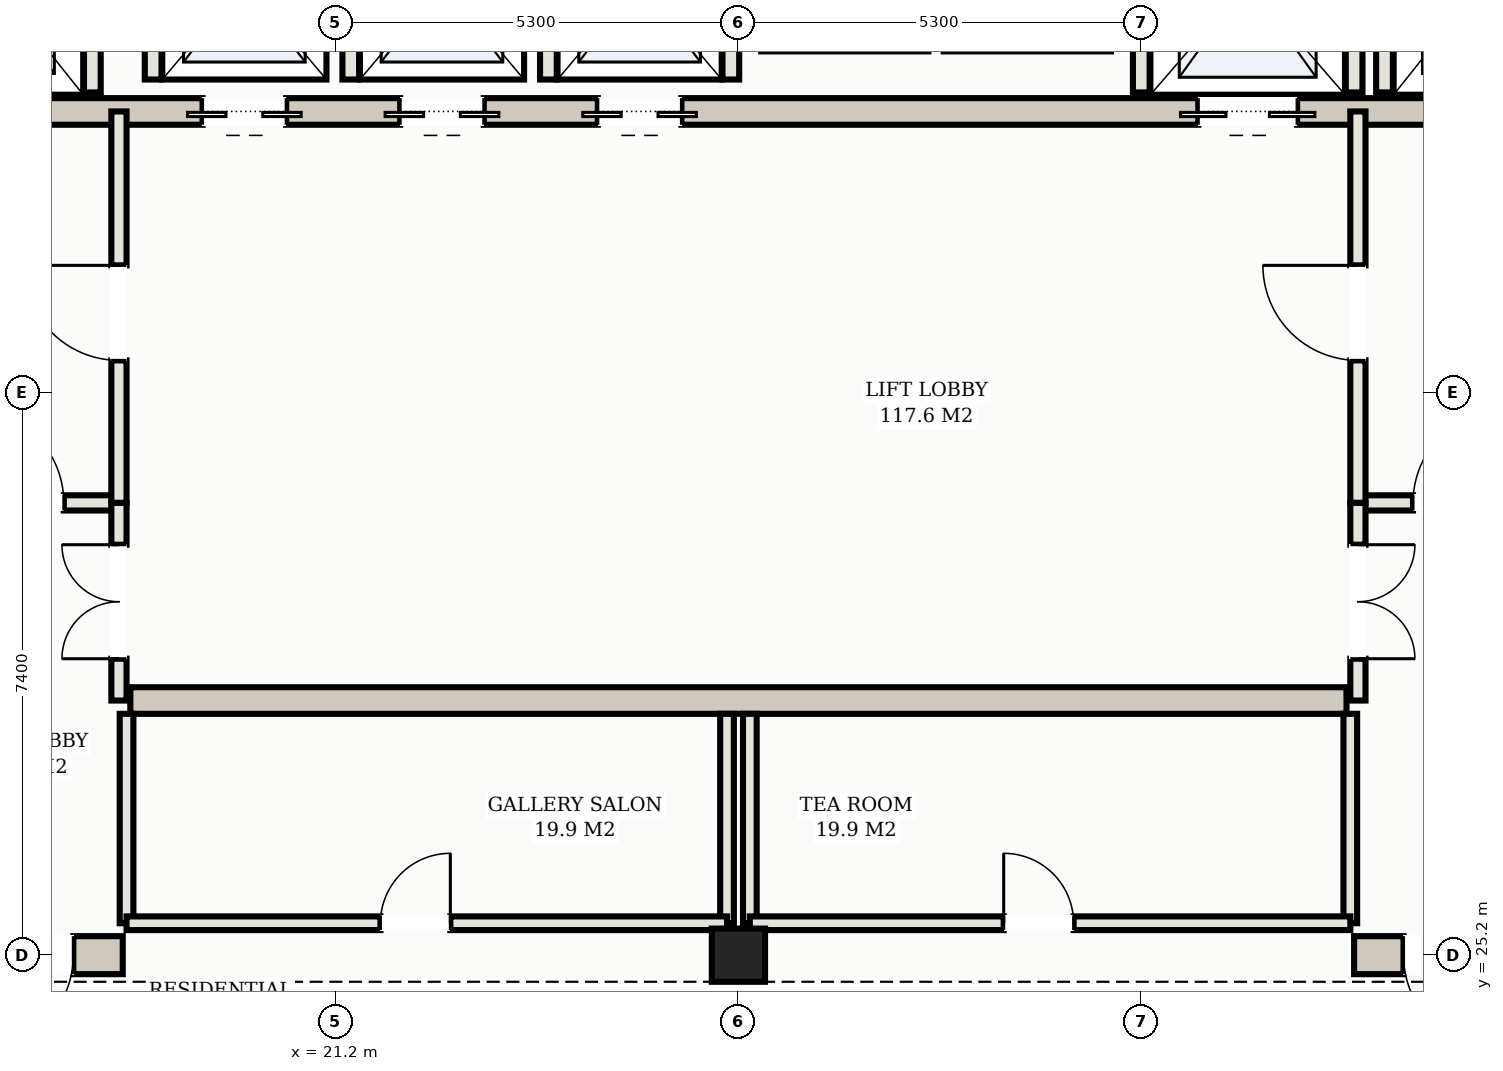
"""IFC4 building model, lengths in metres.
Left out: names, types, materials, properties, quantities, classifications, styles, units other than length and angle.
Written with IfcOpenShell. Run it as: python <this file> out.ifc"""

import sys

from ifc_helpers import new_model, si_unit, direction, frame, frame_2d, origin, origin_2d, place, context, subcontext, project, spatial, rectangle, hollow_rectangle, extrude, element, fill, save


model = new_model("IFC4")
c1 = context("Model", 3, precision=1e-05, world=origin(), true_north=direction((0.0, 1.0)))
c2 = subcontext(c1, "Body", "Model", "MODEL_VIEW")
j1 = project(units=[si_unit("LENGTHUNIT", "METRE"), si_unit("PLANEANGLEUNIT", "RADIAN")], contexts=[c1])
p1 = place(None, origin())
s1 = spatial("IfcSite", under=j1, at=p1, CompositionType="ELEMENT")
p2 = place(p1, origin())
s2 = spatial("IfcBuilding", under=s1, at=p2, CompositionType="ELEMENT")
p3 = place(p2, frame((0.0, 0.0, 242.9)))
s3 = spatial("IfcBuildingStorey", under=s2, at=p3, CompositionType="ELEMENT", Elevation=242.9)
p4 = place(p3, frame((10.35, 25.2, 0.0), z_axis=(0.0, 0.0, 1.0), x_axis=(1.0, 0.0, 0.0)))
e1 = element("IfcWall", 1, at=p4, inside=s3, PredefinedType="SHEAR", context=c2, shape_type="SweptSolid", body=[
    extrude(rectangle(XDim=8.05, YDim=0.5, at=frame_2d((4.025, 0.0))), origin(), (0.0, 0.0, 1.0), 3.11),
])
p5 = place(p4, frame((6.15, 0.0, 0.0)))
e2 = element("IfcOpeningElement", 2, at=p5, cuts=e1, PredefinedType="OPENING", context=c2, shape_type="SweptSolid", body=[
    extrude(rectangle(XDim=1.25, YDim=2.2, at=frame_2d((0.625, 1.1))), frame((0.0, 0.26, 0.0), z_axis=(0.0, -1.0, 0.0), x_axis=(1.0, 0.0, 0.0)), (0.0, 0.0, 1.0), 0.52),
])
p6 = place(p3, frame((34.6, 25.2, 0.0), z_axis=(0.0, 0.0, 1.0), x_axis=(1.0, 0.0, 0.0)))
e3 = element("IfcWall", 3, at=p6, inside=s3, PredefinedType="SHEAR", context=c2, shape_type="SweptSolid", body=[
    extrude(rectangle(XDim=8.05, YDim=0.5, at=frame_2d((4.025, 0.0))), origin(), (0.0, 0.0, 1.0), 3.11),
])
p7 = place(p6, frame((0.65, 0.0, 0.0)))
e4 = element("IfcOpeningElement", 4, at=p7, cuts=e3, PredefinedType="OPENING", context=c2, shape_type="SweptSolid", body=[
    extrude(rectangle(XDim=1.25, YDim=2.2, at=frame_2d((0.625, 1.1))), frame((0.0, 0.26, 0.0), z_axis=(0.0, -1.0, 0.0), x_axis=(1.0, 0.0, 0.0)), (0.0, 0.0, 1.0), 0.52),
])
p8 = place(p3, frame((15.5, 36.3, 0.0), z_axis=(0.0, 0.0, 1.0), x_axis=(1.0, 0.0, 0.0)))
e5 = element("IfcWall", 5, at=p8, inside=s3, PredefinedType="SHEAR", context=c2, shape_type="SweptSolid", body=[
    extrude(rectangle(XDim=22.0, YDim=0.35, at=frame_2d((11.0, 0.0))), origin(), (0.0, 0.0, 1.0), 3.11),
])
p9 = place(p8, frame((0.65, 0.0, 0.0)))
e6 = element("IfcOpeningElement", 6, at=p9, cuts=e5, PredefinedType="OPENING", context=c2, shape_type="SweptSolid", body=[
    extrude(rectangle(XDim=1.1, YDim=2.15, at=frame_2d((0.55, 1.075))), frame((0.0, 0.185, 0.0), z_axis=(0.0, -1.0, 0.0), x_axis=(1.0, 0.0, 0.0)), (0.0, 0.0, 1.0), 0.37),
])
p10 = place(p8, frame((20.25, 0.0, 0.0)))
e7 = element("IfcOpeningElement", 7, at=p10, cuts=e5, PredefinedType="OPENING", context=c2, shape_type="SweptSolid", body=[
    extrude(rectangle(XDim=1.1, YDim=2.15, at=frame_2d((0.55, 1.075))), frame((0.0, 0.185, 0.0), z_axis=(0.0, -1.0, 0.0), x_axis=(1.0, 0.0, 0.0)), (0.0, 0.0, 1.0), 0.37),
])
p11 = place(p8, frame((17.05, 0.0, 0.0)))
e8 = element("IfcOpeningElement", 8, at=p11, cuts=e5, PredefinedType="OPENING", context=c2, shape_type="SweptSolid", body=[
    extrude(rectangle(XDim=1.3, YDim=2.2, at=frame_2d((0.65, 1.1))), frame((0.0, 0.185, 0.0), z_axis=(0.0, -1.0, 0.0), x_axis=(1.0, 0.0, 0.0)), (0.0, 0.0, 1.0), 0.37),
])
p12 = place(p8, frame((3.95, 0.0, 0.0)))
e9 = element("IfcOpeningElement", 9, at=p12, cuts=e5, PredefinedType="OPENING", context=c2, shape_type="SweptSolid", body=[
    extrude(rectangle(XDim=1.1, YDim=2.15, at=frame_2d((0.55, 1.075))), frame((0.0, 0.185, 0.0), z_axis=(0.0, -1.0, 0.0), x_axis=(1.0, 0.0, 0.0)), (0.0, 0.0, 1.0), 0.37),
])
p13 = place(p8, frame((6.55, 0.0, 0.0)))
e10 = element("IfcOpeningElement", 10, at=p13, cuts=e5, PredefinedType="OPENING", context=c2, shape_type="SweptSolid", body=[
    extrude(rectangle(XDim=1.1, YDim=2.15, at=frame_2d((0.55, 1.075))), frame((0.0, 0.185, 0.0), z_axis=(0.0, -1.0, 0.0), x_axis=(1.0, 0.0, 0.0)), (0.0, 0.0, 1.0), 0.37),
])
p14 = place(p8, frame((9.15, 0.0, 0.0)))
e11 = element("IfcOpeningElement", 11, at=p14, cuts=e5, PredefinedType="OPENING", context=c2, shape_type="SweptSolid", body=[
    extrude(rectangle(XDim=1.1, YDim=2.15, at=frame_2d((0.55, 1.075))), frame((0.0, 0.185, 0.0), z_axis=(0.0, -1.0, 0.0), x_axis=(1.0, 0.0, 0.0)), (0.0, 0.0, 1.0), 0.37),
])
p15 = place(p3, frame((18.5, 28.55, 0.0), z_axis=(0.0, 0.0, 1.0), x_axis=(1.0, 0.0, 0.0)))
e12 = element("IfcWall", 12, at=p15, inside=s3, PredefinedType="SHEAR", context=c2, shape_type="SweptSolid", body=[
    extrude(rectangle(XDim=16.0, YDim=0.35, at=frame_2d((8.0, 0.0))), origin(), (0.0, 0.0, 1.0), 3.11),
])
p16 = place(p3, frame((26.5, 25.2, 0.0), z_axis=(0.0, 0.0, 1.0), x_axis=(1.0, 0.0, 0.0)))
e13 = element("IfcColumn", 13, at=p16, inside=s3, PredefinedType="COLUMN", context=c2, shape_type="SweptSolid", body=[
    extrude(hollow_rectangle(XDim=0.7, YDim=0.7, WallThickness=0.025, at=origin_2d()), origin(), (0.0, 0.0, 1.0), 3.3),
])
for number, where, z_axis, x_axis in (
    (14, (18.0, 36.55, 0.0), (0.0, 0.0, 1.0), (0.0, 1.0, 0.0)),
    (15, (35.0, 36.55, 0.0), (0.0, 0.0, 1.0), (0.0, 1.0, 0.0)),
    (16, (31.8, 36.55, 0.0), (0.0, 0.0, 1.0), (0.0, 1.0, 0.0)),
    (17, (34.6, 36.55, 0.0), (0.0, 0.0, 1.0), (0.0, 1.0, 0.0)),
):
    element("IfcWall", number, at=place(p3, frame(where, z_axis=z_axis, x_axis=x_axis)), inside=s3, PredefinedType="SOLIDWALL", context=c2, shape_type="SweptSolid", body=[
        extrude(rectangle(XDim=2.93, YDim=0.22, at=frame_2d((1.465, 0.0))), origin(), (0.0, 0.0, 1.0), 3.11),
    ])
for number, where, z_axis, x_axis in (
    (18, (18.8, 36.72, 0.0), (0.0, 0.0, 1.0), (0.0, 1.0, 0.0)),
    (19, (21.4, 36.72, 0.0), (0.0, 0.0, 1.0), (0.0, 1.0, 0.0)),
    (20, (24.0, 36.72, 0.0), (0.0, 0.0, 1.0), (0.0, 1.0, 0.0)),
    (21, (26.4, 36.72, 0.0), (0.0, 0.0, 1.0), (0.0, 1.0, 0.0)),
):
    element("IfcWall", number, at=place(p3, frame(where, z_axis=z_axis, x_axis=x_axis)), inside=s3, PredefinedType="SOLIDWALL", context=c2, shape_type="SweptSolid", body=[
        extrude(rectangle(XDim=2.56, YDim=0.22, at=frame_2d((1.28, 0.0))), origin(), (0.0, 0.0, 1.0), 3.11),
    ])
p17 = place(p3, frame((15.1, 31.15, 0.0), z_axis=(0.0, 0.0, 1.0), x_axis=(1.0, 0.0, 0.0)))
e22 = element("IfcWall", 22, at=p17, inside=s3, PredefinedType="PARTITIONING", context=c2, shape_type="SweptSolid", body=[
    extrude(rectangle(XDim=3.25, YDim=0.2, at=frame_2d((1.625, 0.0))), origin(), (0.0, 0.0, 1.0), 2.45),
])
p18 = place(p17, frame((1.275, 0.0, 0.0)))
e23 = element("IfcOpeningElement", 23, at=p18, cuts=e22, PredefinedType="OPENING", context=c2, shape_type="SweptSolid", body=[
    extrude(rectangle(XDim=1.25, YDim=2.2, at=frame_2d((0.625, 1.1))), frame((0.0, 0.11, 0.0), z_axis=(0.0, -1.0, 0.0), x_axis=(1.0, 0.0, 0.0)), (0.0, 0.0, 1.0), 0.22),
])
p19 = place(p3, frame((18.35, 31.15, 0.0), z_axis=(0.0, 0.0, 1.0), x_axis=(0.0, 1.0, 0.0)))
e24 = element("IfcWall", 24, at=p19, inside=s3, PredefinedType="PARTITIONING", context=c2, shape_type="SweptSolid", body=[
    extrude(rectangle(XDim=5.15, YDim=0.2, at=frame_2d((2.575, 0.0))), origin(), (0.0, 0.0, 1.0), 2.45),
])
p20 = place(p19, frame((1.875, 0.0, 0.0)))
e25 = element("IfcOpeningElement", 25, at=p20, cuts=e24, PredefinedType="OPENING", context=c2, shape_type="SweptSolid", body=[
    extrude(rectangle(XDim=1.25, YDim=2.2, at=frame_2d((0.625, 1.1))), frame((0.0, 0.11, 0.0), z_axis=(0.0, -1.0, 0.0), x_axis=(1.0, 0.0, 0.0)), (0.0, 0.0, 1.0), 0.22),
])
p21 = place(p3, frame((34.65, 31.15, 0.0), z_axis=(0.0, 0.0, 1.0), x_axis=(1.0, 0.0, 0.0)))
e26 = element("IfcWall", 26, at=p21, inside=s3, PredefinedType="PARTITIONING", context=c2, shape_type="SweptSolid", body=[
    extrude(rectangle(XDim=3.25, YDim=0.2, at=frame_2d((1.625, 0.0))), origin(), (0.0, 0.0, 1.0), 2.45),
])
p22 = place(p21, frame((0.725, 0.0, 0.0)))
e27 = element("IfcOpeningElement", 27, at=p22, cuts=e26, PredefinedType="OPENING", context=c2, shape_type="SweptSolid", body=[
    extrude(rectangle(XDim=1.25, YDim=2.2, at=frame_2d((0.625, 1.1))), frame((0.0, 0.11, 0.0), z_axis=(0.0, -1.0, 0.0), x_axis=(1.0, 0.0, 0.0)), (0.0, 0.0, 1.0), 0.22),
])
p23 = place(p3, frame((34.65, 31.15, 0.0), z_axis=(0.0, 0.0, 1.0), x_axis=(0.0, 1.0, 0.0)))
e28 = element("IfcWall", 28, at=p23, inside=s3, PredefinedType="PARTITIONING", context=c2, shape_type="SweptSolid", body=[
    extrude(rectangle(XDim=5.15, YDim=0.2, at=frame_2d((2.575, 0.0))), origin(), (0.0, 0.0, 1.0), 2.45),
])
p24 = place(p23, frame((1.875, 0.0, 0.0)))
e29 = element("IfcOpeningElement", 29, at=p24, cuts=e28, PredefinedType="OPENING", context=c2, shape_type="SweptSolid", body=[
    extrude(rectangle(XDim=1.25, YDim=2.2, at=frame_2d((0.625, 1.1))), frame((0.0, 0.11, 0.0), z_axis=(0.0, -1.0, 0.0), x_axis=(1.0, 0.0, 0.0)), (0.0, 0.0, 1.0), 0.22),
])
p25 = place(p3, frame((18.35, 28.55, 0.0), z_axis=(0.0, 0.0, 1.0), x_axis=(0.0, 1.0, 0.0)))
e30 = element("IfcWall", 30, at=p25, inside=s3, PredefinedType="PARTITIONING", context=c2, shape_type="SweptSolid", body=[
    extrude(rectangle(XDim=2.6, YDim=0.2, at=frame_2d((1.3, 0.0))), origin(), (0.0, 0.0, 1.0), 2.45),
])
p26 = place(p25, frame((0.55, 0.0, 0.0)))
e31 = element("IfcOpeningElement", 31, at=p26, cuts=e30, PredefinedType="OPENING", context=c2, shape_type="SweptSolid", body=[
    extrude(rectangle(XDim=1.5, YDim=2.25, at=frame_2d((0.75, 1.125))), frame((0.0, 0.11, 0.0), z_axis=(0.0, -1.0, 0.0), x_axis=(1.0, 0.0, 0.0)), (0.0, 0.0, 1.0), 0.22),
])
p27 = place(p3, frame((34.65, 28.55, 0.0), z_axis=(0.0, 0.0, 1.0), x_axis=(0.0, 1.0, 0.0)))
e32 = element("IfcWall", 32, at=p27, inside=s3, PredefinedType="PARTITIONING", context=c2, shape_type="SweptSolid", body=[
    extrude(rectangle(XDim=2.6, YDim=0.2, at=frame_2d((1.3, 0.0))), origin(), (0.0, 0.0, 1.0), 2.45),
])
p28 = place(p27, frame((0.55, 0.0, 0.0)))
e33 = element("IfcOpeningElement", 33, at=p28, cuts=e32, PredefinedType="OPENING", context=c2, shape_type="SweptSolid", body=[
    extrude(rectangle(XDim=1.5, YDim=2.25, at=frame_2d((0.75, 1.125))), frame((0.0, 0.11, 0.0), z_axis=(0.0, -1.0, 0.0), x_axis=(1.0, 0.0, 0.0)), (0.0, 0.0, 1.0), 0.22),
])
for number, where, z_axis, x_axis in (
    (34, (18.45, 25.62, 0.0), (0.0, 0.0, 1.0), (0.0, 1.0, 0.0)),
    (35, (26.35, 25.62, 0.0), (0.0, 0.0, 1.0), (0.0, 1.0, 0.0)),
):
    element("IfcWall", number, at=place(p3, frame(where, z_axis=z_axis, x_axis=x_axis)), inside=s3, PredefinedType="PARTITIONING", context=c2, shape_type="SweptSolid", body=[
        extrude(rectangle(XDim=2.755, YDim=0.18, at=frame_2d((1.377, 0.0))), origin(), (0.0, 0.0, 1.0), 2.45),
    ])
p29 = place(p3, frame((18.45, 25.62, 0.0), z_axis=(0.0, 0.0, 1.0), x_axis=(1.0, 0.0, 0.0)))
e36 = element("IfcWall", 36, at=p29, inside=s3, PredefinedType="PARTITIONING", context=c2, shape_type="SweptSolid", body=[
    extrude(rectangle(XDim=7.9, YDim=0.18, at=frame_2d((3.95, 0.0))), origin(), (0.0, 0.0, 1.0), 2.45),
])
p30 = place(p29, frame((3.34, 0.0, 0.0)))
e37 = element("IfcOpeningElement", 37, at=p30, cuts=e36, PredefinedType="OPENING", context=c2, shape_type="SweptSolid", body=[
    extrude(rectangle(XDim=0.92, YDim=2.15, at=frame_2d((0.46, 1.075))), frame((0.0, 0.1, 0.0), z_axis=(0.0, -1.0, 0.0), x_axis=(1.0, 0.0, 0.0)), (0.0, 0.0, 1.0), 0.2),
])
for number, where, z_axis, x_axis in (
    (38, (26.65, 25.62, 0.0), (0.0, 0.0, 1.0), (0.0, 1.0, 0.0)),
    (39, (34.55, 25.62, 0.0), (0.0, 0.0, 1.0), (0.0, 1.0, 0.0)),
):
    element("IfcWall", number, at=place(p3, frame(where, z_axis=z_axis, x_axis=x_axis)), inside=s3, PredefinedType="PARTITIONING", context=c2, shape_type="SweptSolid", body=[
        extrude(rectangle(XDim=2.755, YDim=0.18, at=frame_2d((1.377, 0.0))), origin(), (0.0, 0.0, 1.0), 2.45),
    ])
p31 = place(p3, frame((26.65, 25.62, 0.0), z_axis=(0.0, 0.0, 1.0), x_axis=(1.0, 0.0, 0.0)))
e40 = element("IfcWall", 40, at=p31, inside=s3, PredefinedType="PARTITIONING", context=c2, shape_type="SweptSolid", body=[
    extrude(rectangle(XDim=7.9, YDim=0.18, at=frame_2d((3.95, 0.0))), origin(), (0.0, 0.0, 1.0), 2.45),
])
p32 = place(p31, frame((3.34, 0.0, 0.0)))
e41 = element("IfcOpeningElement", 41, at=p32, cuts=e40, PredefinedType="OPENING", context=c2, shape_type="SweptSolid", body=[
    extrude(rectangle(XDim=0.92, YDim=2.15, at=frame_2d((0.46, 1.075))), frame((0.0, 0.1, 0.0), z_axis=(0.0, -1.0, 0.0), x_axis=(1.0, 0.0, 0.0)), (0.0, 0.0, 1.0), 0.2),
])
p33 = place(p11, frame((1.3, 0.0, 0.0), z_axis=(0.0, 0.0, 1.0), x_axis=(-1.0, 0.0, 0.0)))
e42 = element("IfcDoor", 42, at=p33, inside=s3, OperationType="DOUBLE_DOOR_SLIDING", PredefinedType="DOOR", context=c2, shape_type="SweptSolid", body=[
    extrude(rectangle(XDim=1.3, YDim=2.2, at=frame_2d((0.65, 1.1))), frame((0.0, 0.025, 0.0), z_axis=(0.0, -1.0, 0.0), x_axis=(1.0, 0.0, 0.0)), (0.0, 0.0, 1.0), 0.05),
])
fill(e8, e42)
p34 = place(p12, frame((1.1, 0.0, 0.0), z_axis=(0.0, 0.0, 1.0), x_axis=(-1.0, 0.0, 0.0)))
e43 = element("IfcDoor", 43, at=p34, inside=s3, OperationType="DOUBLE_DOOR_SLIDING", PredefinedType="DOOR", context=c2, shape_type="SweptSolid", body=[
    extrude(rectangle(XDim=1.1, YDim=2.15, at=frame_2d((0.55, 1.075))), frame((0.0, 0.025, 0.0), z_axis=(0.0, -1.0, 0.0), x_axis=(1.0, 0.0, 0.0)), (0.0, 0.0, 1.0), 0.05),
])
fill(e9, e43)
p35 = place(p13, frame((1.1, 0.0, 0.0), z_axis=(0.0, 0.0, 1.0), x_axis=(-1.0, 0.0, 0.0)))
e44 = element("IfcDoor", 44, at=p35, inside=s3, OperationType="DOUBLE_DOOR_SLIDING", PredefinedType="DOOR", context=c2, shape_type="SweptSolid", body=[
    extrude(rectangle(XDim=1.1, YDim=2.15, at=frame_2d((0.55, 1.075))), frame((0.0, 0.025, 0.0), z_axis=(0.0, -1.0, 0.0), x_axis=(1.0, 0.0, 0.0)), (0.0, 0.0, 1.0), 0.05),
])
fill(e10, e44)
p36 = place(p14, frame((1.1, 0.0, 0.0), z_axis=(0.0, 0.0, 1.0), x_axis=(-1.0, 0.0, 0.0)))
e45 = element("IfcDoor", 45, at=p36, inside=s3, OperationType="DOUBLE_DOOR_SLIDING", PredefinedType="DOOR", context=c2, shape_type="SweptSolid", body=[
    extrude(rectangle(XDim=1.1, YDim=2.15, at=frame_2d((0.55, 1.075))), frame((0.0, 0.025, 0.0), z_axis=(0.0, -1.0, 0.0), x_axis=(1.0, 0.0, 0.0)), (0.0, 0.0, 1.0), 0.05),
])
fill(e11, e45)
p37 = place(p5, frame((1.25, 0.0, 0.0), z_axis=(0.0, 0.0, 1.0), x_axis=(-1.0, 0.0, 0.0)))
e46 = element("IfcDoor", 46, at=p37, inside=s3, OperationType="SINGLE_SWING_RIGHT", PredefinedType="DOOR", context=c2, shape_type="SweptSolid", body=[
    extrude(rectangle(XDim=1.25, YDim=2.2, at=frame_2d((0.625, 1.1))), frame((0.0, 0.025, 0.0), z_axis=(0.0, -1.0, 0.0), x_axis=(1.0, 0.0, 0.0)), (0.0, 0.0, 1.0), 0.05),
])
fill(e2, e46)
p38 = place(p7, frame((1.25, 0.0, 0.0), z_axis=(0.0, 0.0, 1.0), x_axis=(-1.0, 0.0, 0.0)))
e47 = element("IfcDoor", 47, at=p38, inside=s3, OperationType="SINGLE_SWING_LEFT", PredefinedType="DOOR", context=c2, shape_type="SweptSolid", body=[
    extrude(rectangle(XDim=1.25, YDim=2.2, at=frame_2d((0.625, 1.1))), frame((0.0, 0.025, 0.0), z_axis=(0.0, -1.0, 0.0), x_axis=(1.0, 0.0, 0.0)), (0.0, 0.0, 1.0), 0.05),
])
fill(e4, e47)
p39 = place(p18, origin())
e48 = element("IfcDoor", 48, at=p39, inside=s3, OperationType="SINGLE_SWING_LEFT", PredefinedType="DOOR", context=c2, shape_type="SweptSolid", body=[
    extrude(rectangle(XDim=1.25, YDim=2.2, at=frame_2d((0.625, 1.1))), frame((0.0, 0.025, 0.0), z_axis=(0.0, -1.0, 0.0), x_axis=(1.0, 0.0, 0.0)), (0.0, 0.0, 1.0), 0.05),
])
fill(e23, e48)
p40 = place(p20, origin())
e49 = element("IfcDoor", 49, at=p40, inside=s3, OperationType="SINGLE_SWING_RIGHT", PredefinedType="DOOR", context=c2, shape_type="SweptSolid", body=[
    extrude(rectangle(XDim=1.25, YDim=2.2, at=frame_2d((0.625, 1.1))), frame((0.0, 0.025, 0.0), z_axis=(0.0, -1.0, 0.0), x_axis=(1.0, 0.0, 0.0)), (0.0, 0.0, 1.0), 0.05),
])
fill(e25, e49)
p41 = place(p22, origin())
e50 = element("IfcDoor", 50, at=p41, inside=s3, OperationType="SINGLE_SWING_RIGHT", PredefinedType="DOOR", context=c2, shape_type="SweptSolid", body=[
    extrude(rectangle(XDim=1.25, YDim=2.2, at=frame_2d((0.625, 1.1))), frame((0.0, 0.025, 0.0), z_axis=(0.0, -1.0, 0.0), x_axis=(1.0, 0.0, 0.0)), (0.0, 0.0, 1.0), 0.05),
])
fill(e27, e50)
p42 = place(p24, origin())
e51 = element("IfcDoor", 51, at=p42, inside=s3, OperationType="SINGLE_SWING_RIGHT", PredefinedType="DOOR", context=c2, shape_type="SweptSolid", body=[
    extrude(rectangle(XDim=1.25, YDim=2.2, at=frame_2d((0.625, 1.1))), frame((0.0, 0.025, 0.0), z_axis=(0.0, -1.0, 0.0), x_axis=(1.0, 0.0, 0.0)), (0.0, 0.0, 1.0), 0.05),
])
fill(e29, e51)
p43 = place(p26, origin())
e52 = element("IfcDoor", 52, at=p43, inside=s3, OperationType="DOUBLE_DOOR_SINGLE_SWING", PredefinedType="DOOR", context=c2, shape_type="SweptSolid", body=[
    extrude(rectangle(XDim=1.5, YDim=2.25, at=frame_2d((0.75, 1.125))), frame((0.0, 0.025, 0.0), z_axis=(0.0, -1.0, 0.0), x_axis=(1.0, 0.0, 0.0)), (0.0, 0.0, 1.0), 0.05),
])
fill(e31, e52)
p44 = place(p28, frame((1.5, 0.0, 0.0), z_axis=(0.0, 0.0, 1.0), x_axis=(-1.0, 0.0, 0.0)))
e53 = element("IfcDoor", 53, at=p44, inside=s3, OperationType="DOUBLE_DOOR_SINGLE_SWING", PredefinedType="DOOR", context=c2, shape_type="SweptSolid", body=[
    extrude(rectangle(XDim=1.5, YDim=2.25, at=frame_2d((0.75, 1.125))), frame((0.0, 0.025, 0.0), z_axis=(0.0, -1.0, 0.0), x_axis=(1.0, 0.0, 0.0)), (0.0, 0.0, 1.0), 0.05),
])
fill(e33, e53)
p45 = place(p30, origin())
e54 = element("IfcDoor", 54, at=p45, inside=s3, OperationType="SINGLE_SWING_RIGHT", PredefinedType="DOOR", context=c2, shape_type="SweptSolid", body=[
    extrude(rectangle(XDim=0.92, YDim=2.15, at=frame_2d((0.46, 1.075))), frame((0.0, 0.025, 0.0), z_axis=(0.0, -1.0, 0.0), x_axis=(1.0, 0.0, 0.0)), (0.0, 0.0, 1.0), 0.05),
])
fill(e37, e54)
p46 = place(p32, origin())
e55 = element("IfcDoor", 55, at=p46, inside=s3, OperationType="SINGLE_SWING_LEFT", PredefinedType="DOOR", context=c2, shape_type="SweptSolid", body=[
    extrude(rectangle(XDim=0.92, YDim=2.15, at=frame_2d((0.46, 1.075))), frame((0.0, 0.025, 0.0), z_axis=(0.0, -1.0, 0.0), x_axis=(1.0, 0.0, 0.0)), (0.0, 0.0, 1.0), 0.05),
])
fill(e41, e55)
save(model, sys.argv[1])
